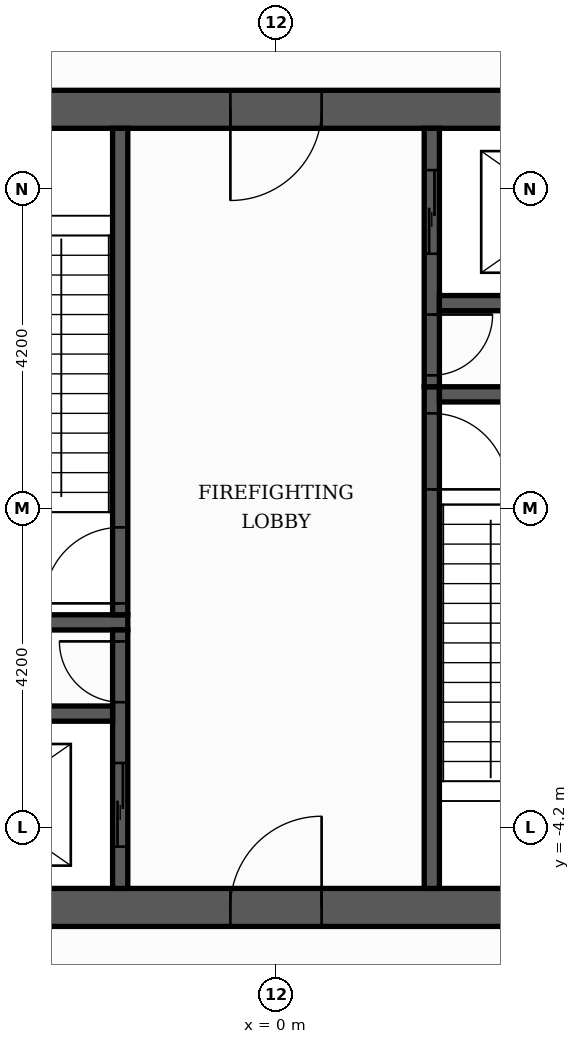
"""IFC4 building model, lengths in metres.
Left out: names, types, materials, properties, quantities, classifications, styles, units other than length and angle.
Written with IfcOpenShell. Run it as: python <this file> out.ifc"""

import sys

from ifc_helpers import new_model, si_unit, direction, frame, frame_2d, origin, place, context, subcontext, project, spatial, rectangle, extrude, element, fill, save


model = new_model("IFC4")
c1 = context("Model", 3, precision=1e-05, world=origin(), true_north=direction((0.0, 1.0)))
c2 = subcontext(c1, "Body", "Model", "MODEL_VIEW")
j1 = project(units=[si_unit("LENGTHUNIT", "METRE"), si_unit("PLANEANGLEUNIT", "RADIAN")], contexts=[c1])
p1 = place(None, origin())
s1 = spatial("IfcSite", under=j1, at=p1, CompositionType="ELEMENT")
p2 = place(p1, origin())
s2 = spatial("IfcBuilding", under=s1, at=p2, CompositionType="ELEMENT")
p3 = place(p2, frame((0.0, 0.0, 235.2)))
s3 = spatial("IfcBuildingStorey", under=s2, at=p3, CompositionType="ELEMENT", Elevation=235.2)
p4 = place(p3, frame((-5.5, -5.25, 0.0), z_axis=(0.0, 0.0, 1.0), x_axis=(1.0, 0.0, 0.0)))
e1 = element("IfcWall", 1, at=p4, inside=s3, PredefinedType="SHEAR", context=c2, shape_type="SweptSolid", body=[
    extrude(rectangle(XDim=11.0, YDim=0.5, at=frame_2d((5.5, 0.0))), origin(), (0.0, 0.0, 1.0), 4.98),
])
p5 = place(p4, frame((4.9, 0.0, 0.0)))
e2 = element("IfcOpeningElement", 2, at=p5, cuts=e1, PredefinedType="OPENING", context=c2, shape_type="SweptSolid", body=[
    extrude(rectangle(XDim=1.2, YDim=2.1, at=frame_2d((0.6, 1.05))), frame((0.0, 0.26, 0.0), z_axis=(0.0, -1.0, 0.0), x_axis=(1.0, 0.0, 0.0)), (0.0, 0.0, 1.0), 0.52),
])
p6 = place(p3, frame((-5.0, 5.25, 0.0), z_axis=(0.0, 0.0, 1.0), x_axis=(1.0, 0.0, 0.0)))
e3 = element("IfcWall", 3, at=p6, inside=s3, PredefinedType="SHEAR", context=c2, shape_type="SweptSolid", body=[
    extrude(rectangle(XDim=10.0, YDim=0.5, at=frame_2d((5.0, 0.0))), origin(), (0.0, 0.0, 1.0), 4.98),
])
p7 = place(p6, frame((4.4, 0.0, 0.0)))
e4 = element("IfcOpeningElement", 4, at=p7, cuts=e3, PredefinedType="OPENING", context=c2, shape_type="SweptSolid", body=[
    extrude(rectangle(XDim=1.2, YDim=2.1, at=frame_2d((0.6, 1.05))), frame((0.0, 0.26, 0.0), z_axis=(0.0, -1.0, 0.0), x_axis=(1.0, 0.0, 0.0)), (0.0, 0.0, 1.0), 0.52),
])
p8 = place(p3, frame((2.05, -5.0, 0.0), z_axis=(0.0, 0.0, 1.0), x_axis=(0.0, 1.0, 0.0)))
e5 = element("IfcWall", 5, at=p8, inside=s3, PredefinedType="SHEAR", context=c2, shape_type="SweptSolid", body=[
    extrude(rectangle(XDim=6.6, YDim=0.2, at=frame_2d((3.3, 0.0))), origin(), (0.0, 0.0, 1.0), 4.98),
])
p9 = place(p8, frame((5.25, 0.0, 0.0)))
e6 = element("IfcOpeningElement", 6, at=p9, cuts=e5, PredefinedType="OPENING", context=c2, shape_type="SweptSolid", body=[
    extrude(rectangle(XDim=1.0, YDim=2.1, at=frame_2d((0.5, 1.05))), frame((0.0, 0.11, 0.0), z_axis=(0.0, -1.0, 0.0), x_axis=(1.0, 0.0, 0.0)), (0.0, 0.0, 1.0), 0.22),
])
p10 = place(p3, frame((-5.0, -1.5, 0.0), z_axis=(0.0, 0.0, 1.0), x_axis=(1.0, 0.0, 0.0)))
e7 = element("IfcWall", 7, at=p10, inside=s3, PredefinedType="SHEAR", context=c2, shape_type="SweptSolid", body=[
    extrude(rectangle(XDim=3.05, YDim=0.2, at=frame_2d((1.525, 0.0))), origin(), (0.0, 0.0, 1.0), 4.98),
])
p11 = place(p3, frame((-2.05, -1.4, 0.0), z_axis=(0.0, 0.0, 1.0), x_axis=(0.0, 1.0, 0.0)))
e8 = element("IfcWall", 8, at=p11, inside=s3, PredefinedType="SHEAR", context=c2, shape_type="SweptSolid", body=[
    extrude(rectangle(XDim=6.4, YDim=0.2, at=frame_2d((3.2, 0.0))), origin(), (0.0, 0.0, 1.0), 4.98),
])
p12 = place(p11, frame((0.15, 0.0, 0.0)))
e9 = element("IfcOpeningElement", 9, at=p12, cuts=e8, PredefinedType="OPENING", context=c2, shape_type="SweptSolid", body=[
    extrude(rectangle(XDim=1.0, YDim=2.1, at=frame_2d((0.5, 1.05))), frame((0.0, 0.11, 0.0), z_axis=(0.0, -1.0, 0.0), x_axis=(1.0, 0.0, 0.0)), (0.0, 0.0, 1.0), 0.22),
])
p13 = place(p3, frame((2.15, 1.5, 0.0), z_axis=(0.0, 0.0, 1.0), x_axis=(1.0, 0.0, 0.0)))
e10 = element("IfcWall", 10, at=p13, inside=s3, PredefinedType="SHEAR", context=c2, shape_type="SweptSolid", body=[
    extrude(rectangle(XDim=2.85, YDim=0.2, at=frame_2d((1.425, 0.0))), origin(), (0.0, 0.0, 1.0), 4.98),
])
p14 = place(p3, frame((-2.05, -5.0, 0.0), z_axis=(0.0, 0.0, 1.0), x_axis=(0.0, 1.0, 0.0)))
e11 = element("IfcWall", 11, at=p14, inside=s3, PredefinedType="SHEAR", context=c2, shape_type="SweptSolid", body=[
    extrude(rectangle(XDim=3.4, YDim=0.2, at=frame_2d((1.7, 0.0))), origin(), (0.0, 0.0, 1.0), 4.98),
])
p15 = place(p14, frame((0.55, 0.0, 0.0)))
e12 = element("IfcOpeningElement", 12, at=p15, cuts=e11, PredefinedType="OPENING", context=c2, shape_type="SweptSolid", body=[
    extrude(rectangle(XDim=1.1, YDim=2.1, at=frame_2d((0.55, 1.05))), frame((0.0, 0.11, 0.0), z_axis=(0.0, -1.0, 0.0), x_axis=(1.0, 0.0, 0.0)), (0.0, 0.0, 1.0), 0.22),
])
p16 = place(p14, frame((2.45, 0.0, 0.0)))
e13 = element("IfcOpeningElement", 13, at=p16, cuts=e11, PredefinedType="OPENING", context=c2, shape_type="SweptSolid", body=[
    extrude(rectangle(XDim=0.8, YDim=2.1, at=frame_2d((0.4, 1.05))), frame((0.0, 0.11, 0.0), z_axis=(0.0, -1.0, 0.0), x_axis=(1.0, 0.0, 0.0)), (0.0, 0.0, 1.0), 0.22),
])
p17 = place(p3, frame((-5.0, -2.7, 0.0), z_axis=(0.0, 0.0, 1.0), x_axis=(1.0, 0.0, 0.0)))
e14 = element("IfcWall", 14, at=p17, inside=s3, PredefinedType="SHEAR", context=c2, shape_type="SweptSolid", body=[
    extrude(rectangle(XDim=2.85, YDim=0.2, at=frame_2d((1.425, 0.0))), origin(), (0.0, 0.0, 1.0), 4.98),
])
p18 = place(p3, frame((2.05, 1.6, 0.0), z_axis=(0.0, 0.0, 1.0), x_axis=(0.0, 1.0, 0.0)))
e15 = element("IfcWall", 15, at=p18, inside=s3, PredefinedType="SHEAR", context=c2, shape_type="SweptSolid", body=[
    extrude(rectangle(XDim=3.4, YDim=0.2, at=frame_2d((1.7, 0.0))), origin(), (0.0, 0.0, 1.0), 4.98),
])
p19 = place(p18, frame((1.75, 0.0, 0.0)))
e16 = element("IfcOpeningElement", 16, at=p19, cuts=e15, PredefinedType="OPENING", context=c2, shape_type="SweptSolid", body=[
    extrude(rectangle(XDim=1.1, YDim=2.1, at=frame_2d((0.55, 1.05))), frame((0.0, 0.11, 0.0), z_axis=(0.0, -1.0, 0.0), x_axis=(1.0, 0.0, 0.0)), (0.0, 0.0, 1.0), 0.22),
])
p20 = place(p18, frame((0.15, 0.0, 0.0)))
e17 = element("IfcOpeningElement", 17, at=p20, cuts=e15, PredefinedType="OPENING", context=c2, shape_type="SweptSolid", body=[
    extrude(rectangle(XDim=0.8, YDim=2.1, at=frame_2d((0.4, 1.05))), frame((0.0, 0.11, 0.0), z_axis=(0.0, -1.0, 0.0), x_axis=(1.0, 0.0, 0.0)), (0.0, 0.0, 1.0), 0.22),
])
p21 = place(p3, frame((2.15, 2.7, 0.0), z_axis=(0.0, 0.0, 1.0), x_axis=(1.0, 0.0, 0.0)))
e18 = element("IfcWall", 18, at=p21, inside=s3, PredefinedType="SHEAR", context=c2, shape_type="SweptSolid", body=[
    extrude(rectangle(XDim=2.85, YDim=0.2, at=frame_2d((1.425, 0.0))), origin(), (0.0, 0.0, 1.0), 4.98),
])
p22 = place(p19, origin())
e19 = element("IfcDoor", 19, at=p22, inside=s3, OperationType="SLIDING_TO_LEFT", PredefinedType="DOOR", context=c2, shape_type="SweptSolid", body=[
    extrude(rectangle(XDim=1.1, YDim=2.1, at=frame_2d((0.55, 1.05))), frame((0.0, 0.025, 0.0), z_axis=(0.0, -1.0, 0.0), x_axis=(1.0, 0.0, 0.0)), (0.0, 0.0, 1.0), 0.05),
])
fill(e16, e19)
p23 = place(p15, origin())
e20 = element("IfcDoor", 20, at=p23, inside=s3, OperationType="SLIDING_TO_LEFT", PredefinedType="DOOR", context=c2, shape_type="SweptSolid", body=[
    extrude(rectangle(XDim=1.1, YDim=2.1, at=frame_2d((0.55, 1.05))), frame((0.0, 0.025, 0.0), z_axis=(0.0, -1.0, 0.0), x_axis=(1.0, 0.0, 0.0)), (0.0, 0.0, 1.0), 0.05),
])
fill(e12, e20)
p24 = place(p12, origin())
e21 = element("IfcDoor", 21, at=p24, inside=s3, OperationType="SINGLE_SWING_LEFT", PredefinedType="DOOR", context=c2, shape_type="SweptSolid", body=[
    extrude(rectangle(XDim=1.0, YDim=2.1, at=frame_2d((0.5, 1.05))), frame((0.0, 0.025, 0.0), z_axis=(0.0, -1.0, 0.0), x_axis=(1.0, 0.0, 0.0)), (0.0, 0.0, 1.0), 0.05),
])
fill(e9, e21)
p25 = place(p9, frame((1.0, 0.0, 0.0), z_axis=(0.0, 0.0, 1.0), x_axis=(-1.0, 0.0, 0.0)))
e22 = element("IfcDoor", 22, at=p25, inside=s3, OperationType="SINGLE_SWING_LEFT", PredefinedType="DOOR", context=c2, shape_type="SweptSolid", body=[
    extrude(rectangle(XDim=1.0, YDim=2.1, at=frame_2d((0.5, 1.05))), frame((0.0, 0.025, 0.0), z_axis=(0.0, -1.0, 0.0), x_axis=(1.0, 0.0, 0.0)), (0.0, 0.0, 1.0), 0.05),
])
fill(e6, e22)
p26 = place(p20, frame((0.8, 0.0, 0.0), z_axis=(0.0, 0.0, 1.0), x_axis=(-1.0, 0.0, 0.0)))
e23 = element("IfcDoor", 23, at=p26, inside=s3, OperationType="SINGLE_SWING_RIGHT", PredefinedType="DOOR", context=c2, shape_type="SweptSolid", body=[
    extrude(rectangle(XDim=0.8, YDim=2.1, at=frame_2d((0.4, 1.05))), frame((0.0, 0.025, 0.0), z_axis=(0.0, -1.0, 0.0), x_axis=(1.0, 0.0, 0.0)), (0.0, 0.0, 1.0), 0.05),
])
fill(e17, e23)
p27 = place(p16, origin())
e24 = element("IfcDoor", 24, at=p27, inside=s3, OperationType="SINGLE_SWING_RIGHT", PredefinedType="DOOR", context=c2, shape_type="SweptSolid", body=[
    extrude(rectangle(XDim=0.8, YDim=2.1, at=frame_2d((0.4, 1.05))), frame((0.0, 0.025, 0.0), z_axis=(0.0, -1.0, 0.0), x_axis=(1.0, 0.0, 0.0)), (0.0, 0.0, 1.0), 0.05),
])
fill(e13, e24)
p28 = place(p7, frame((1.2, 0.0, 0.0), z_axis=(0.0, 0.0, 1.0), x_axis=(-1.0, 0.0, 0.0)))
e25 = element("IfcDoor", 25, at=p28, inside=s3, OperationType="SINGLE_SWING_LEFT", PredefinedType="DOOR", context=c2, shape_type="SweptSolid", body=[
    extrude(rectangle(XDim=1.2, YDim=2.1, at=frame_2d((0.6, 1.05))), frame((0.0, 0.025, 0.0), z_axis=(0.0, -1.0, 0.0), x_axis=(1.0, 0.0, 0.0)), (0.0, 0.0, 1.0), 0.05),
])
fill(e4, e25)
p29 = place(p5, origin())
e26 = element("IfcDoor", 26, at=p29, inside=s3, OperationType="SINGLE_SWING_RIGHT", PredefinedType="DOOR", context=c2, shape_type="SweptSolid", body=[
    extrude(rectangle(XDim=1.2, YDim=2.1, at=frame_2d((0.6, 1.05))), frame((0.0, 0.025, 0.0), z_axis=(0.0, -1.0, 0.0), x_axis=(1.0, 0.0, 0.0)), (0.0, 0.0, 1.0), 0.05),
])
fill(e2, e26)
save(model, sys.argv[1])
